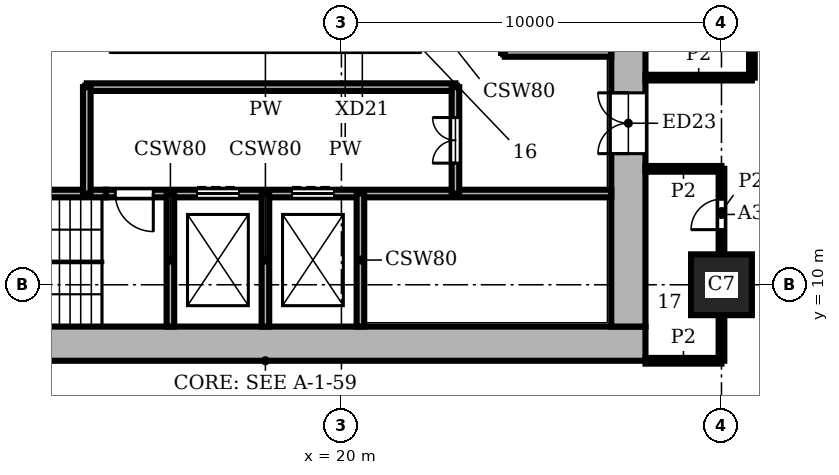
"""IFC4 building model, lengths in metres.
Left out: names, types, materials, properties, quantities, classifications, styles, units other than length and angle.
Written with IfcOpenShell. Run it as: python <this file> out.ifc"""

import sys

from ifc_helpers import new_model, si_unit, direction, frame, frame_2d, origin, origin_2d, place, context, subcontext, project, spatial, rectangle, extrude, element, fill, save


model = new_model("IFC4")
c1 = context("Model", 3, precision=1e-05, world=origin(), true_north=direction((0.0, 1.0)))
c2 = subcontext(c1, "Body", "Model", "MODEL_VIEW")
j1 = project(units=[si_unit("LENGTHUNIT", "METRE"), si_unit("PLANEANGLEUNIT", "RADIAN")], contexts=[c1])
p1 = place(None, origin())
s1 = spatial("IfcSite", under=j1, at=p1, CompositionType="ELEMENT")
p2 = place(p1, origin())
s2 = spatial("IfcBuilding", under=s1, at=p2, CompositionType="ELEMENT")
p3 = place(p2, frame((0.0, 0.0, 43.2)))
s3 = spatial("IfcBuildingStorey", under=s2, at=p3, CompositionType="ELEMENT", Elevation=43.2)
p4 = place(p3, frame((30.0, 10.0, 0.0), z_axis=(0.0, 0.0, 1.0), x_axis=(1.0, 0.0, 0.0)))
e1 = element("IfcColumn", 1, at=p4, inside=s3, PredefinedType="COLUMN", context=c2, shape_type="SweptSolid", body=[
    extrude(rectangle(XDim=1.6, YDim=1.6, at=origin_2d()), origin(), (0.0, 0.0, 1.0), 3.9),
])
p5 = place(p3, frame((8.0, 8.45, 0.0), z_axis=(0.0, 0.0, 1.0), x_axis=(1.0, 0.0, 0.0)))
e2 = element("IfcWall", 2, at=p5, inside=s3, PredefinedType="SHEAR", context=c2, shape_type="SweptSolid", body=[
    extrude(rectangle(XDim=20.0, YDim=0.9, at=frame_2d((10.0, 0.0))), origin(), (0.0, 0.0, 1.0), 3.9),
])
p6 = place(p3, frame((27.55, 8.9, 0.0), z_axis=(0.0, 0.0, 1.0), x_axis=(0.0, 1.0, 0.0)))
e3 = element("IfcWall", 3, at=p6, inside=s3, PredefinedType="SHEAR", context=c2, shape_type="SweptSolid", body=[
    extrude(rectangle(XDim=18.2, YDim=0.9, at=frame_2d((9.1, 0.0))), origin(), (0.0, 0.0, 1.0), 3.9),
])
p7 = place(p6, frame((4.55, 0.0, 0.0)))
e4 = element("IfcOpeningElement", 4, at=p7, cuts=e3, PredefinedType="OPENING", context=c2, shape_type="SweptSolid", body=[
    extrude(rectangle(XDim=1.6, YDim=2.1, at=frame_2d((0.8, 1.05))), frame((0.0, 0.46, 0.0), z_axis=(0.0, -1.0, 0.0), x_axis=(1.0, 0.0, 0.0)), (0.0, 0.0, 1.0), 0.92),
])
p8 = place(p3, frame((8.9, 12.4, 0.0), z_axis=(0.0, 0.0, 1.0), x_axis=(1.0, 0.0, 0.0)))
e5 = element("IfcWall", 5, at=p8, inside=s3, PredefinedType="SHEAR", context=c2, shape_type="SweptSolid", body=[
    extrude(rectangle(XDim=4.9, YDim=0.2, at=frame_2d((2.45, 0.0))), origin(), (0.0, 0.0, 1.0), 3.58),
])
p9 = place(p3, frame((13.8, 12.4, 0.0), z_axis=(0.0, 0.0, 1.0), x_axis=(1.0, 0.0, 0.0)))
e6 = element("IfcWall", 6, at=p9, inside=s3, PredefinedType="SHEAR", context=c2, shape_type="SweptSolid", body=[
    extrude(rectangle(XDim=13.3, YDim=0.2, at=frame_2d((6.65, 0.0))), origin(), (0.0, 0.0, 1.0), 3.58),
])
p10 = place(p9, frame((2.4, 0.0, 0.0)))
e7 = element("IfcOpeningElement", 7, at=p10, cuts=e6, PredefinedType="OPENING", context=c2, shape_type="SweptSolid", body=[
    extrude(rectangle(XDim=1.1, YDim=2.1, at=frame_2d((0.55, 1.05))), frame((0.0, 0.11, 0.0), z_axis=(0.0, -1.0, 0.0), x_axis=(1.0, 0.0, 0.0)), (0.0, 0.0, 1.0), 0.22),
])
p11 = place(p9, frame((4.9, 0.0, 0.0)))
e8 = element("IfcOpeningElement", 8, at=p11, cuts=e6, PredefinedType="OPENING", context=c2, shape_type="SweptSolid", body=[
    extrude(rectangle(XDim=1.1, YDim=2.1, at=frame_2d((0.55, 1.05))), frame((0.0, 0.11, 0.0), z_axis=(0.0, -1.0, 0.0), x_axis=(1.0, 0.0, 0.0)), (0.0, 0.0, 1.0), 0.22),
])
p12 = place(p9, frame((0.25, 0.0, 0.0)))
e9 = element("IfcOpeningElement", 9, at=p12, cuts=e6, PredefinedType="OPENING", context=c2, shape_type="SweptSolid", body=[
    extrude(rectangle(XDim=1.0, YDim=2.1, at=frame_2d((0.5, 1.05))), frame((0.0, 0.11, 0.0), z_axis=(0.0, -1.0, 0.0), x_axis=(1.0, 0.0, 0.0)), (0.0, 0.0, 1.0), 0.22),
])
p13 = place(p3, frame((13.3, 15.2, 0.0), z_axis=(0.0, 0.0, 1.0), x_axis=(1.0, 0.0, 0.0)))
e10 = element("IfcWall", 10, at=p13, inside=s3, PredefinedType="SHEAR", context=c2, shape_type="SweptSolid", body=[
    extrude(rectangle(XDim=9.7, YDim=0.2, at=frame_2d((4.85, 0.0))), origin(), (0.0, 0.0, 1.0), 3.58),
])
for number, where, z_axis, x_axis in (
    (11, (24.3, 16.1, 0.0), (0.0, 0.0, 1.0), (1.0, 0.0, 0.0)),
    (12, (13.3, 12.4, 0.0), (0.0, 0.0, 1.0), (0.0, 1.0, 0.0)),
):
    element("IfcWall", number, at=place(p3, frame(where, z_axis=z_axis, x_axis=x_axis)), inside=s3, PredefinedType="SHEAR", context=c2, shape_type="SweptSolid", body=[
        extrude(rectangle(XDim=2.8, YDim=0.2, at=frame_2d((1.4, 0.0))), origin(), (0.0, 0.0, 1.0), 3.58),
    ])
for number, where, z_axis, x_axis in (
    (13, (15.5, 8.9, 0.0), (0.0, 0.0, 1.0), (0.0, 1.0, 0.0)),
    (14, (18.0, 8.9, 0.0), (0.0, 0.0, 1.0), (0.0, 1.0, 0.0)),
    (15, (20.5, 8.9, 0.0), (0.0, 0.0, 1.0), (0.0, 1.0, 0.0)),
):
    element("IfcWall", number, at=place(p3, frame(where, z_axis=z_axis, x_axis=x_axis)), inside=s3, PredefinedType="SHEAR", context=c2, shape_type="SweptSolid", body=[
        extrude(rectangle(XDim=3.5, YDim=0.2, at=frame_2d((1.75, 0.0))), origin(), (0.0, 0.0, 1.0), 3.58),
    ])
p14 = place(p3, frame((23.0, 12.4, 0.0), z_axis=(0.0, 0.0, 1.0), x_axis=(0.0, 1.0, 0.0)))
e16 = element("IfcWall", 16, at=p14, inside=s3, PredefinedType="SHEAR", context=c2, shape_type="SweptSolid", body=[
    extrude(rectangle(XDim=2.8, YDim=0.2, at=frame_2d((1.4, 0.0))), origin(), (0.0, 0.0, 1.0), 3.58),
])
p15 = place(p14, frame((0.8, 0.0, 0.0)))
e17 = element("IfcOpeningElement", 17, at=p15, cuts=e16, PredefinedType="OPENING", context=c2, shape_type="SweptSolid", body=[
    extrude(rectangle(XDim=1.2, YDim=2.1, at=frame_2d((0.6, 1.05))), frame((0.0, 0.11, 0.0), z_axis=(0.0, -1.0, 0.0), x_axis=(1.0, 0.0, 0.0)), (0.0, 0.0, 1.0), 0.22),
])
p16 = place(p3, frame((30.0, 8.0, 0.0), z_axis=(0.0, 0.0, 1.0), x_axis=(0.0, 1.0, 0.0)))
e18 = element("IfcWall", 18, at=p16, inside=s3, PredefinedType="PARTITIONING", context=c2, shape_type="SweptSolid", body=[
    extrude(rectangle(XDim=1.2, YDim=0.15, at=frame_2d((0.6, 0.0))), origin(), (0.0, 0.0, 1.0), 3.58),
])
p17 = place(p3, frame((30.0, 10.8, 0.0), z_axis=(0.0, 0.0, 1.0), x_axis=(0.0, 1.0, 0.0)))
e19 = element("IfcWall", 19, at=p17, inside=s3, PredefinedType="PARTITIONING", context=c2, shape_type="SweptSolid", body=[
    extrude(rectangle(XDim=2.25, YDim=0.15, at=frame_2d((1.125, 0.0))), origin(), (0.0, 0.0, 1.0), 3.58),
])
p18 = place(p17, frame((0.65, 0.0, 0.0)))
e20 = element("IfcOpeningElement", 20, at=p18, cuts=e19, PredefinedType="OPENING", context=c2, shape_type="SweptSolid", body=[
    extrude(rectangle(XDim=0.8, YDim=2.1, at=frame_2d((0.4, 1.05))), frame((0.0, 0.085, 0.0), z_axis=(0.0, -1.0, 0.0), x_axis=(1.0, 0.0, 0.0)), (0.0, 0.0, 1.0), 0.17),
])
p19 = place(p3, frame((30.8, 15.45, 0.0), z_axis=(0.0, 0.0, 1.0), x_axis=(0.0, 1.0, 0.0)))
e21 = element("IfcWall", 21, at=p19, inside=s3, PredefinedType="PARTITIONING", context=c2, shape_type="SweptSolid", body=[
    extrude(rectangle(XDim=3.75, YDim=0.15, at=frame_2d((1.875, 0.0))), origin(), (0.0, 0.0, 1.0), 3.58),
])
p20 = place(p19, frame((1.35, 0.0, 0.0)))
e22 = element("IfcOpeningElement", 22, at=p20, cuts=e21, PredefinedType="OPENING", context=c2, shape_type="SweptSolid", body=[
    extrude(rectangle(XDim=1.1, YDim=2.1, at=frame_2d((0.55, 1.05))), frame((0.0, 0.085, 0.0), z_axis=(0.0, -1.0, 0.0), x_axis=(1.0, 0.0, 0.0)), (0.0, 0.0, 1.0), 0.17),
])
for number, where, z_axis, x_axis in (
    (23, (28.0, 8.0, 0.0), (0.0, 0.0, 1.0), (1.0, 0.0, 0.0)),
    (24, (28.0, 13.05, 0.0), (0.0, 0.0, 1.0), (1.0, 0.0, 0.0)),
):
    element("IfcWall", number, at=place(p3, frame(where, z_axis=z_axis, x_axis=x_axis)), inside=s3, PredefinedType="PARTITIONING", context=c2, shape_type="SweptSolid", body=[
        extrude(rectangle(XDim=2.0, YDim=0.15, at=frame_2d((1.0, 0.0))), origin(), (0.0, 0.0, 1.0), 3.58),
    ])
p21 = place(p3, frame((28.0, 15.45, 0.0), z_axis=(0.0, 0.0, 1.0), x_axis=(1.0, 0.0, 0.0)))
e25 = element("IfcWall", 25, at=p21, inside=s3, PredefinedType="PARTITIONING", context=c2, shape_type="SweptSolid", body=[
    extrude(rectangle(XDim=2.8, YDim=0.15, at=frame_2d((1.4, 0.0))), origin(), (0.0, 0.0, 1.0), 3.58),
])
p22 = place(p10, origin())
e26 = element("IfcDoor", 26, at=p22, inside=s3, OperationType="DOUBLE_DOOR_SLIDING", PredefinedType="DOOR", context=c2, shape_type="SweptSolid", body=[
    extrude(rectangle(XDim=1.1, YDim=2.1, at=frame_2d((0.55, 1.05))), frame((0.0, 0.025, 0.0), z_axis=(0.0, -1.0, 0.0), x_axis=(1.0, 0.0, 0.0)), (0.0, 0.0, 1.0), 0.05),
])
fill(e7, e26)
p23 = place(p11, origin())
e27 = element("IfcDoor", 27, at=p23, inside=s3, OperationType="DOUBLE_DOOR_SLIDING", PredefinedType="DOOR", context=c2, shape_type="SweptSolid", body=[
    extrude(rectangle(XDim=1.1, YDim=2.1, at=frame_2d((0.55, 1.05))), frame((0.0, 0.025, 0.0), z_axis=(0.0, -1.0, 0.0), x_axis=(1.0, 0.0, 0.0)), (0.0, 0.0, 1.0), 0.05),
])
fill(e8, e27)
p24 = place(p12, frame((1.0, 0.0, 0.0), z_axis=(0.0, 0.0, 1.0), x_axis=(-1.0, 0.0, 0.0)))
e28 = element("IfcDoor", 28, at=p24, inside=s3, OperationType="SINGLE_SWING_LEFT", PredefinedType="DOOR", context=c2, shape_type="SweptSolid", body=[
    extrude(rectangle(XDim=1.0, YDim=2.1, at=frame_2d((0.5, 1.05))), frame((0.0, 0.025, 0.0), z_axis=(0.0, -1.0, 0.0), x_axis=(1.0, 0.0, 0.0)), (0.0, 0.0, 1.0), 0.05),
])
fill(e9, e28)
p25 = place(p15, origin())
e29 = element("IfcDoor", 29, at=p25, inside=s3, OperationType="DOUBLE_DOOR_SINGLE_SWING", PredefinedType="DOOR", context=c2, shape_type="SweptSolid", body=[
    extrude(rectangle(XDim=1.2, YDim=2.1, at=frame_2d((0.6, 1.05))), frame((0.0, 0.025, 0.0), z_axis=(0.0, -1.0, 0.0), x_axis=(1.0, 0.0, 0.0)), (0.0, 0.0, 1.0), 0.05),
])
fill(e17, e29)
p26 = place(p7, origin())
e30 = element("IfcDoor", 30, at=p26, inside=s3, OperationType="DOUBLE_DOOR_SINGLE_SWING", PredefinedType="DOOR", context=c2, shape_type="SweptSolid", body=[
    extrude(rectangle(XDim=1.6, YDim=2.1, at=frame_2d((0.8, 1.05))), frame((0.0, 0.025, 0.0), z_axis=(0.0, -1.0, 0.0), x_axis=(1.0, 0.0, 0.0)), (0.0, 0.0, 1.0), 0.05),
])
fill(e4, e30)
p27 = place(p18, origin())
e31 = element("IfcDoor", 31, at=p27, inside=s3, OperationType="SINGLE_SWING_LEFT", PredefinedType="DOOR", context=c2, shape_type="SweptSolid", body=[
    extrude(rectangle(XDim=0.8, YDim=2.1, at=frame_2d((0.4, 1.05))), frame((0.0, 0.025, 0.0), z_axis=(0.0, -1.0, 0.0), x_axis=(1.0, 0.0, 0.0)), (0.0, 0.0, 1.0), 0.05),
])
fill(e20, e31)
save(model, sys.argv[1])
